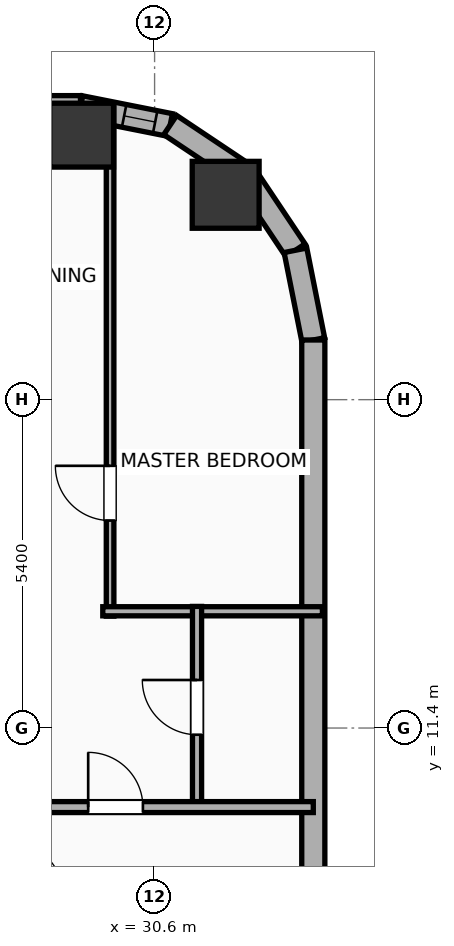
"""IFC4 building model, lengths in metres.
Left out: names, types, materials, properties, quantities, classifications, styles, units other than length and angle.
Written with IfcOpenShell. Run it as: python <this file> out.ifc"""

import sys

from ifc_helpers import new_model, si_unit, direction, frame, frame_2d, origin, origin_2d, place, context, subcontext, project, spatial, rectangle, hollow_rectangle, hollow_circle, extrude, element, fill, save


model = new_model("IFC4")
c1 = context("Model", 3, precision=1e-05, world=origin(), true_north=direction((0.0, 1.0)))
c2 = subcontext(c1, "Body", "Model", "MODEL_VIEW")
j1 = project(units=[si_unit("LENGTHUNIT", "METRE"), si_unit("PLANEANGLEUNIT", "RADIAN")], contexts=[c1])
p1 = place(None, origin())
s1 = spatial("IfcSite", under=j1, at=p1, CompositionType="ELEMENT")
p2 = place(p1, origin())
s2 = spatial("IfcBuilding", under=s1, at=p2, CompositionType="ELEMENT")
p3 = place(p2, frame((0.0, 0.0, 105.3)))
s3 = spatial("IfcBuildingStorey", under=s2, at=p3, CompositionType="ELEMENT", Elevation=105.3)
p4 = place(p3, frame((31.769, 20.169, 0.0), z_axis=(0.0, 0.0, 1.0), x_axis=(1.0, 0.0, 0.0)))
e1 = element("IfcColumn", 1, at=p4, inside=s3, PredefinedType="COLUMN", context=c2, shape_type="SweptSolid", body=[
    extrude(hollow_circle(Radius=0.55, WallThickness=0.036, at=origin_2d()), origin(), (0.0, 0.0, 1.0), 3.9),
])
p5 = place(p3, frame((29.4, 21.15, 0.0), z_axis=(0.0, 0.0, 1.0), x_axis=(1.0, 0.0, 0.0)))
e2 = element("IfcColumn", 2, at=p5, inside=s3, PredefinedType="COLUMN", context=c2, shape_type="SweptSolid", body=[
    extrude(hollow_rectangle(XDim=1.05, YDim=1.05, WallThickness=0.036, at=origin_2d()), origin(), (0.0, 0.0, 1.0), 3.9),
])
p6 = place(p3, frame((-25.381, 21.61, 0.0), z_axis=(0.0, 0.0, 1.0), x_axis=(1.0, 0.0, 0.0)))
e3 = element("IfcWall", 3, at=p6, inside=s3, PredefinedType="ELEMENTEDWALL", context=c2, shape_type="SweptSolid", body=[
    extrude(rectangle(XDim=54.763, YDim=0.38, at=frame_2d((27.381, 0.0))), origin(), (0.0, 0.0, 1.0), 3.65),
])
p7 = place(p6, frame((45.067, 0.0, 0.75)))
e4 = element("IfcOpeningElement", 4, at=p7, cuts=e3, PredefinedType="OPENING", context=c2, shape_type="SweptSolid", body=[
    extrude(rectangle(XDim=2.4, YDim=2.1, at=frame_2d((1.2, 1.05))), frame((0.0, 0.2, 0.0), z_axis=(0.0, -1.0, 0.0), x_axis=(1.0, 0.0, 0.0)), (0.0, 0.0, 1.0), 0.4),
])
p8 = place(p6, frame((4.076, 0.0, 0.75)))
e5 = element("IfcOpeningElement", 5, at=p8, cuts=e3, PredefinedType="OPENING", context=c2, shape_type="SweptSolid", body=[
    extrude(rectangle(XDim=1.2, YDim=2.05, at=frame_2d((0.6, 1.025))), frame((0.0, 0.2, 0.0), z_axis=(0.0, -1.0, 0.0), x_axis=(1.0, 0.0, 0.0)), (0.0, 0.0, 1.0), 0.4),
])
p9 = place(p6, frame((9.395, 0.0, 0.75)))
e6 = element("IfcOpeningElement", 6, at=p9, cuts=e3, PredefinedType="OPENING", context=c2, shape_type="SweptSolid", body=[
    extrude(rectangle(XDim=0.85, YDim=2.05, at=frame_2d((0.425, 1.025))), frame((0.0, 0.2, 0.0), z_axis=(0.0, -1.0, 0.0), x_axis=(1.0, 0.0, 0.0)), (0.0, 0.0, 1.0), 0.4),
])
p10 = place(p6, frame((7.205, 0.0, 0.75)))
e7 = element("IfcOpeningElement", 7, at=p10, cuts=e3, PredefinedType="OPENING", context=c2, shape_type="SweptSolid", body=[
    extrude(rectangle(XDim=1.2, YDim=2.05, at=frame_2d((0.6, 1.025))), frame((0.0, 0.2, 0.0), z_axis=(0.0, -1.0, 0.0), x_axis=(1.0, 0.0, 0.0)), (0.0, 0.0, 1.0), 0.4),
])
p11 = place(p6, frame((13.676, 0.0, 0.75)))
e8 = element("IfcOpeningElement", 8, at=p11, cuts=e3, PredefinedType="OPENING", context=c2, shape_type="SweptSolid", body=[
    extrude(rectangle(XDim=1.2, YDim=2.05, at=frame_2d((0.6, 1.025))), frame((0.0, 0.2, 0.0), z_axis=(0.0, -1.0, 0.0), x_axis=(1.0, 0.0, 0.0)), (0.0, 0.0, 1.0), 0.4),
])
p12 = place(p6, frame((17.136, 0.0, 0.75)))
e9 = element("IfcOpeningElement", 9, at=p12, cuts=e3, PredefinedType="OPENING", context=c2, shape_type="SweptSolid", body=[
    extrude(rectangle(XDim=1.2, YDim=2.05, at=frame_2d((0.6, 1.025))), frame((0.0, 0.2, 0.0), z_axis=(0.0, -1.0, 0.0), x_axis=(1.0, 0.0, 0.0)), (0.0, 0.0, 1.0), 0.4),
])
p13 = place(p6, frame((22.656, 0.0, 0.75)))
e10 = element("IfcOpeningElement", 10, at=p13, cuts=e3, PredefinedType="OPENING", context=c2, shape_type="SweptSolid", body=[
    extrude(rectangle(XDim=1.2, YDim=2.05, at=frame_2d((0.6, 1.025))), frame((0.0, 0.2, 0.0), z_axis=(0.0, -1.0, 0.0), x_axis=(1.0, 0.0, 0.0)), (0.0, 0.0, 1.0), 0.4),
])
p14 = place(p6, frame((29.443, 0.0, 0.75)))
e11 = element("IfcOpeningElement", 11, at=p14, cuts=e3, PredefinedType="OPENING", context=c2, shape_type="SweptSolid", body=[
    extrude(rectangle(XDim=1.2, YDim=2.05, at=frame_2d((0.6, 1.025))), frame((0.0, 0.2, 0.0), z_axis=(0.0, -1.0, 0.0), x_axis=(1.0, 0.0, 0.0)), (0.0, 0.0, 1.0), 0.4),
])
p15 = place(p6, frame((26.348, 0.0, 0.75)))
e12 = element("IfcOpeningElement", 12, at=p15, cuts=e3, PredefinedType="OPENING", context=c2, shape_type="SweptSolid", body=[
    extrude(rectangle(XDim=1.2, YDim=2.05, at=frame_2d((0.6, 1.025))), frame((0.0, 0.2, 0.0), z_axis=(0.0, -1.0, 0.0), x_axis=(1.0, 0.0, 0.0)), (0.0, 0.0, 1.0), 0.4),
])
p16 = place(p6, frame((33.596, 0.0, 0.75)))
e13 = element("IfcOpeningElement", 13, at=p16, cuts=e3, PredefinedType="OPENING", context=c2, shape_type="SweptSolid", body=[
    extrude(rectangle(XDim=1.2, YDim=2.05, at=frame_2d((0.6, 1.025))), frame((0.0, 0.2, 0.0), z_axis=(0.0, -1.0, 0.0), x_axis=(1.0, 0.0, 0.0)), (0.0, 0.0, 1.0), 0.4),
])
p17 = place(p6, frame((36.014, 0.0, 0.75)))
e14 = element("IfcOpeningElement", 14, at=p17, cuts=e3, PredefinedType="OPENING", context=c2, shape_type="SweptSolid", body=[
    extrude(rectangle(XDim=1.2, YDim=2.05, at=frame_2d((0.6, 1.025))), frame((0.0, 0.2, 0.0), z_axis=(0.0, -1.0, 0.0), x_axis=(1.0, 0.0, 0.0)), (0.0, 0.0, 1.0), 0.4),
])
p18 = place(p6, frame((40.814, 0.0, 0.75)))
e15 = element("IfcOpeningElement", 15, at=p18, cuts=e3, PredefinedType="OPENING", context=c2, shape_type="SweptSolid", body=[
    extrude(rectangle(XDim=1.2, YDim=2.05, at=frame_2d((0.6, 1.025))), frame((0.0, 0.2, 0.0), z_axis=(0.0, -1.0, 0.0), x_axis=(1.0, 0.0, 0.0)), (0.0, 0.0, 1.0), 0.4),
])
p19 = place(p6, frame((49.385, 0.0, 0.75)))
e16 = element("IfcOpeningElement", 16, at=p19, cuts=e3, PredefinedType="OPENING", context=c2, shape_type="SweptSolid", body=[
    extrude(rectangle(XDim=1.2, YDim=2.05, at=frame_2d((0.6, 1.025))), frame((0.0, 0.2, 0.0), z_axis=(0.0, -1.0, 0.0), x_axis=(1.0, 0.0, 0.0)), (0.0, 0.0, 1.0), 0.4),
])
p20 = place(p6, frame((52.181, 0.0, 0.75)))
e17 = element("IfcOpeningElement", 17, at=p20, cuts=e3, PredefinedType="OPENING", context=c2, shape_type="SweptSolid", body=[
    extrude(rectangle(XDim=1.2, YDim=2.05, at=frame_2d((0.6, 1.025))), frame((0.0, 0.2, 0.0), z_axis=(0.0, -1.0, 0.0), x_axis=(1.0, 0.0, 0.0)), (0.0, 0.0, 1.0), 0.4),
])
p21 = place(p3, frame((29.381, 21.61, 0.0), z_axis=(0.0, 0.0, 1.0), x_axis=(0.980755066645, -0.195242155415, 0.0)))
e18 = element("IfcWall", 18, at=p21, inside=s3, PredefinedType="ELEMENTEDWALL", context=c2, shape_type="SweptSolid", body=[
    extrude(rectangle(XDim=1.504, YDim=0.38, at=frame_2d((0.752, 0.0))), origin(), (0.0, 0.0, 1.0), 3.65),
])
p22 = place(p21, frame((0.732, 0.0, 0.75)))
e19 = element("IfcOpeningElement", 19, at=p22, cuts=e18, PredefinedType="OPENING", context=c2, shape_type="SweptSolid", body=[
    extrude(rectangle(XDim=0.52, YDim=2.05, at=frame_2d((0.26, 1.025))), frame((0.0, 0.2, 0.0), z_axis=(0.0, -1.0, 0.0), x_axis=(1.0, 0.0, 0.0)), (0.0, 0.0, 1.0), 0.4),
])
p23 = place(p3, frame((30.857, 21.316, 0.0), z_axis=(0.0, 0.0, 1.0), x_axis=(0.831468045563, -0.555572577804, 0.0)))
e20 = element("IfcWall", 20, at=p23, inside=s3, PredefinedType="ELEMENTEDWALL", context=c2, shape_type="SweptSolid", body=[
    extrude(rectangle(XDim=1.485, YDim=0.38, at=frame_2d((0.742, 0.0))), origin(), (0.0, 0.0, 1.0), 3.65),
])
p24 = place(p3, frame((32.091, 20.491, 0.0), z_axis=(0.0, 0.0, 1.0), x_axis=(0.555610286119, -0.831442848281, 0.0)))
e21 = element("IfcWall", 21, at=p24, inside=s3, PredefinedType="ELEMENTEDWALL", context=c2, shape_type="SweptSolid", body=[
    extrude(rectangle(XDim=1.485, YDim=0.38, at=frame_2d((0.743, 0.0))), origin(), (0.0, 0.0, 1.0), 3.65),
])
p25 = place(p3, frame((32.917, 19.257, 0.0), z_axis=(0.0, 0.0, 1.0), x_axis=(0.195086038585, -0.980786132421, 0.0)))
e22 = element("IfcWall", 22, at=p25, inside=s3, PredefinedType="ELEMENTEDWALL", context=c2, shape_type="SweptSolid", body=[
    extrude(rectangle(XDim=1.504, YDim=0.38, at=frame_2d((0.752, 0.0))), origin(), (0.0, 0.0, 1.0), 3.65),
])
p26 = place(p3, frame((33.21, 17.781, 0.0), z_axis=(0.0, 0.0, 1.0), x_axis=(0.0, -1.0, 0.0)))
e23 = element("IfcWall", 23, at=p26, inside=s3, PredefinedType="ELEMENTEDWALL", context=c2, shape_type="SweptSolid", body=[
    extrude(rectangle(XDim=34.363, YDim=0.38, at=frame_2d((17.181, 0.0))), origin(), (0.0, 0.0, 1.0), 3.65),
])
p27 = place(p26, frame((12.836, 0.0, 0.75)))
e24 = element("IfcOpeningElement", 24, at=p27, cuts=e23, PredefinedType="OPENING", context=c2, shape_type="SweptSolid", body=[
    extrude(rectangle(XDim=1.2, YDim=2.05, at=frame_2d((0.6, 1.025))), frame((0.0, 0.2, 0.0), z_axis=(0.0, -1.0, 0.0), x_axis=(1.0, 0.0, 0.0)), (0.0, 0.0, 1.0), 0.4),
])
p28 = place(p26, frame((21.386, 0.0, 0.75)))
e25 = element("IfcOpeningElement", 25, at=p28, cuts=e23, PredefinedType="OPENING", context=c2, shape_type="SweptSolid", body=[
    extrude(rectangle(XDim=1.2, YDim=2.05, at=frame_2d((0.6, 1.025))), frame((0.0, 0.2, 0.0), z_axis=(0.0, -1.0, 0.0), x_axis=(1.0, 0.0, 0.0)), (0.0, 0.0, 1.0), 0.4),
])
p29 = place(p3, frame((29.868, 13.24, 0.0), z_axis=(0.0, 0.0, 1.0), x_axis=(0.0, 1.0, 0.0)))
e26 = element("IfcWall", 26, at=p29, inside=s3, PredefinedType="PARTITIONING", context=c2, shape_type="SweptSolid", body=[
    extrude(rectangle(XDim=8.426, YDim=0.125, at=frame_2d((4.213, 0.0))), origin(), (0.0, 0.0, 1.0), 3.65),
])
p30 = place(p29, frame((1.572, 0.0, 0.0)))
e27 = element("IfcOpeningElement", 27, at=p30, cuts=e26, PredefinedType="OPENING", context=c2, shape_type="SweptSolid", body=[
    extrude(rectangle(XDim=0.9, YDim=2.05, at=frame_2d((0.45, 1.025))), frame((0.0, 0.073, 0.0), z_axis=(0.0, -1.0, 0.0), x_axis=(1.0, 0.0, 0.0)), (0.0, 0.0, 1.0), 0.145),
])
p31 = place(p3, frame((29.748, 13.32, 0.0), z_axis=(0.0, 0.0, 1.0), x_axis=(1.0, 0.0, 0.0)))
e28 = element("IfcWall", 28, at=p31, inside=s3, PredefinedType="PLUMBINGWALL", context=c2, shape_type="SweptSolid", body=[
    extrude(rectangle(XDim=3.612, YDim=0.15, at=frame_2d((1.806, 0.0))), origin(), (0.0, 0.0, 1.0), 3.65),
])
p32 = place(p3, frame((31.298, 10.08, 0.0), z_axis=(0.0, 0.0, 1.0), x_axis=(0.0, 1.0, 0.0)))
e29 = element("IfcWall", 29, at=p32, inside=s3, PredefinedType="PLUMBINGWALL", context=c2, shape_type="SweptSolid", body=[
    extrude(rectangle(XDim=3.32, YDim=0.15, at=frame_2d((1.66, 0.0))), origin(), (0.0, 0.0, 1.0), 3.65),
])
p33 = place(p32, frame((1.21, 0.0, 0.0)))
e30 = element("IfcOpeningElement", 30, at=p33, cuts=e29, PredefinedType="OPENING", context=c2, shape_type="SweptSolid", body=[
    extrude(rectangle(XDim=0.9, YDim=2.05, at=frame_2d((0.45, 1.025))), frame((0.0, 0.085, 0.0), z_axis=(0.0, -1.0, 0.0), x_axis=(1.0, 0.0, 0.0)), (0.0, 0.0, 1.0), 0.17),
])
p34 = place(p3, frame((-29.21, 10.1, 0.0), z_axis=(0.0, 0.0, 1.0), x_axis=(1.0, 0.0, 0.0)))
e31 = element("IfcWall", 31, at=p34, inside=s3, PredefinedType="PARTITIONING", context=c2, shape_type="SweptSolid", body=[
    extrude(rectangle(XDim=62.42, YDim=0.18, at=frame_2d((31.21, 0.0))), origin(), (0.0, 0.0, 1.0), 3.65),
])
p35 = place(p34, frame((4.906, 0.0, 0.0)))
e32 = element("IfcOpeningElement", 32, at=p35, cuts=e31, PredefinedType="OPENING", context=c2, shape_type="SweptSolid", body=[
    extrude(rectangle(XDim=1.15, YDim=2.05, at=frame_2d((0.575, 1.025))), frame((0.0, 0.1, 0.0), z_axis=(0.0, -1.0, 0.0), x_axis=(1.0, 0.0, 0.0)), (0.0, 0.0, 1.0), 0.2),
])
p36 = place(p34, frame((14.812, 0.0, 0.0)))
e33 = element("IfcOpeningElement", 33, at=p36, cuts=e31, PredefinedType="OPENING", context=c2, shape_type="SweptSolid", body=[
    extrude(rectangle(XDim=1.15, YDim=2.05, at=frame_2d((0.575, 1.025))), frame((0.0, 0.1, 0.0), z_axis=(0.0, -1.0, 0.0), x_axis=(1.0, 0.0, 0.0)), (0.0, 0.0, 1.0), 0.2),
])
p37 = place(p34, frame((24.406, 0.0, 0.0)))
e34 = element("IfcOpeningElement", 34, at=p37, cuts=e31, PredefinedType="OPENING", context=c2, shape_type="SweptSolid", body=[
    extrude(rectangle(XDim=1.15, YDim=2.05, at=frame_2d((0.575, 1.025))), frame((0.0, 0.1, 0.0), z_axis=(0.0, -1.0, 0.0), x_axis=(1.0, 0.0, 0.0)), (0.0, 0.0, 1.0), 0.2),
])
p38 = place(p34, frame((33.981, 0.0, 0.0)))
e35 = element("IfcOpeningElement", 35, at=p38, cuts=e31, PredefinedType="OPENING", context=c2, shape_type="SweptSolid", body=[
    extrude(rectangle(XDim=1.15, YDim=2.05, at=frame_2d((0.575, 1.025))), frame((0.0, 0.1, 0.0), z_axis=(0.0, -1.0, 0.0), x_axis=(1.0, 0.0, 0.0)), (0.0, 0.0, 1.0), 0.2),
])
p39 = place(p34, frame((43.138, 0.0, 0.0)))
e36 = element("IfcOpeningElement", 36, at=p39, cuts=e31, PredefinedType="OPENING", context=c2, shape_type="SweptSolid", body=[
    extrude(rectangle(XDim=1.15, YDim=2.05, at=frame_2d((0.575, 1.025))), frame((0.0, 0.1, 0.0), z_axis=(0.0, -1.0, 0.0), x_axis=(1.0, 0.0, 0.0)), (0.0, 0.0, 1.0), 0.2),
])
p40 = place(p34, frame((51.777, 0.0, 0.0)))
e37 = element("IfcOpeningElement", 37, at=p40, cuts=e31, PredefinedType="OPENING", context=c2, shape_type="SweptSolid", body=[
    extrude(rectangle(XDim=0.9, YDim=2.05, at=frame_2d((0.45, 1.025))), frame((0.0, 0.1, 0.0), z_axis=(0.0, -1.0, 0.0), x_axis=(1.0, 0.0, 0.0)), (0.0, 0.0, 1.0), 0.2),
])
p41 = place(p34, frame((58.718, 0.0, 0.0)))
e38 = element("IfcOpeningElement", 38, at=p41, cuts=e31, PredefinedType="OPENING", context=c2, shape_type="SweptSolid", body=[
    extrude(rectangle(XDim=0.9, YDim=2.05, at=frame_2d((0.45, 1.025))), frame((0.0, 0.1, 0.0), z_axis=(0.0, -1.0, 0.0), x_axis=(1.0, 0.0, 0.0)), (0.0, 0.0, 1.0), 0.2),
])
p42 = place(p22, origin())
e39 = element("IfcWindow", 39, at=p42, inside=s3, PartitioningType="SINGLE_PANEL", PredefinedType="WINDOW", context=c2, shape_type="SweptSolid", body=[
    extrude(rectangle(XDim=0.52, YDim=2.05, at=frame_2d((0.26, 1.025))), frame((0.0, 0.03, 0.0), z_axis=(0.0, -1.0, 0.0), x_axis=(1.0, 0.0, 0.0)), (0.0, 0.0, 1.0), 0.06),
])
fill(e19, e39)
p43 = place(p30, origin())
e40 = element("IfcDoor", 40, at=p43, inside=s3, OperationType="SINGLE_SWING_RIGHT", PredefinedType="DOOR", context=c2, shape_type="SweptSolid", body=[
    extrude(rectangle(XDim=0.9, YDim=2.05, at=frame_2d((0.45, 1.025))), frame((0.0, 0.025, 0.0), z_axis=(0.0, -1.0, 0.0), x_axis=(1.0, 0.0, 0.0)), (0.0, 0.0, 1.0), 0.05),
])
fill(e27, e40)
p44 = place(p33, origin())
e41 = element("IfcDoor", 41, at=p44, inside=s3, OperationType="SINGLE_SWING_RIGHT", PredefinedType="DOOR", context=c2, shape_type="SweptSolid", body=[
    extrude(rectangle(XDim=0.9, YDim=2.05, at=frame_2d((0.45, 1.025))), frame((0.0, 0.025, 0.0), z_axis=(0.0, -1.0, 0.0), x_axis=(1.0, 0.0, 0.0)), (0.0, 0.0, 1.0), 0.05),
])
fill(e30, e41)
p45 = place(p41, origin())
e42 = element("IfcDoor", 42, at=p45, inside=s3, OperationType="SINGLE_SWING_LEFT", PredefinedType="DOOR", context=c2, shape_type="SweptSolid", body=[
    extrude(rectangle(XDim=0.9, YDim=2.05, at=frame_2d((0.45, 1.025))), frame((0.0, 0.025, 0.0), z_axis=(0.0, -1.0, 0.0), x_axis=(1.0, 0.0, 0.0)), (0.0, 0.0, 1.0), 0.05),
])
fill(e38, e42)
save(model, sys.argv[1])
